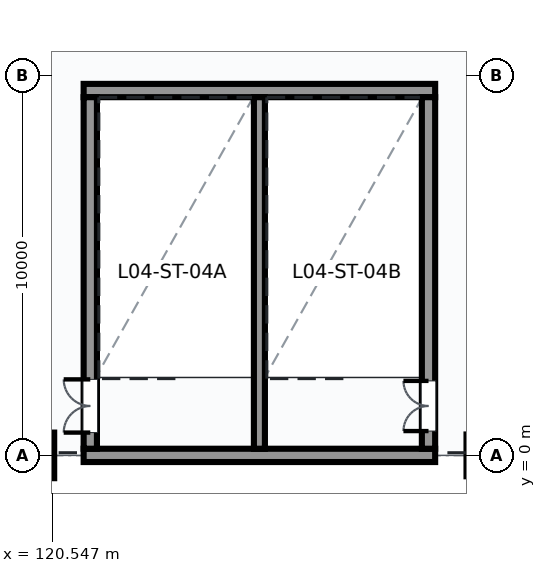
"""IFC4 building model, lengths in metres.
Left out: names, types, materials, properties, quantities, classifications, styles, units other than length and angle.
Written with IfcOpenShell. Run it as: python <this file> out.ifc"""

import sys

from ifc_helpers import new_model, si_unit, direction, frame, frame_2d, origin, origin_2d, place, context, subcontext, project, spatial, rectangle, extrude, element, fill, save


model = new_model("IFC4")
c1 = context("Model", 3, precision=1e-05, world=origin(), true_north=direction((0.0, 1.0)))
c2 = subcontext(c1, "Body", "Model", "MODEL_VIEW")
j1 = project(units=[si_unit("LENGTHUNIT", "METRE"), si_unit("PLANEANGLEUNIT", "RADIAN")], contexts=[c1])
p1 = place(None, origin())
s1 = spatial("IfcSite", under=j1, at=p1, CompositionType="ELEMENT")
p2 = place(p1, origin())
s2 = spatial("IfcBuilding", under=s1, at=p2, CompositionType="ELEMENT")
p3 = place(p2, frame((0.0, 0.0, 19.2)))
s3 = spatial("IfcBuildingStorey", under=s2, at=p3, CompositionType="ELEMENT", Elevation=19.2)
p4 = place(p3, frame((120.0, 0.0, 0.0), z_axis=(0.0, 0.0, 1.0), x_axis=(1.0, 0.0, 0.0)))
e1 = element("IfcColumn", 1, at=p4, inside=s3, PredefinedType="COLUMN", context=c2, shape_type="SweptSolid", body=[
    extrude(rectangle(XDim=1.2, YDim=1.2, at=origin_2d()), origin(), (0.0, 0.0, 1.0), 5.4),
])
for number, where, z_axis, x_axis in (
    (2, (121.375, 0.0, 0.0), (0.0, 0.0, 1.0), (1.0, 0.0, 0.0)),
    (3, (121.375, 9.6, 0.0), (0.0, 0.0, 1.0), (1.0, 0.0, 0.0)),
):
    element("IfcWall", number, at=place(p3, frame(where, z_axis=z_axis, x_axis=x_axis)), inside=s3, PredefinedType="SHEAR", context=c2, shape_type="SweptSolid", body=[
        extrude(rectangle(XDim=9.25, YDim=0.35, at=frame_2d((4.625, 0.0))), origin(), (0.0, 0.0, 1.0), 5.4),
    ])
p5 = place(p3, frame((121.55, 0.175, 0.0), z_axis=(0.0, 0.0, 1.0), x_axis=(0.0, 1.0, 0.0)))
e4 = element("IfcWall", 4, at=p5, inside=s3, PredefinedType="SHEAR", context=c2, shape_type="SweptSolid", body=[
    extrude(rectangle(XDim=9.25, YDim=0.35, at=frame_2d((4.625, 0.0))), origin(), (0.0, 0.0, 1.0), 5.4),
])
p6 = place(p5, frame((0.425, 0.0, 0.0)))
e5 = element("IfcOpeningElement", 5, at=p6, cuts=e4, PredefinedType="OPENING", context=c2, shape_type="SweptSolid", body=[
    extrude(rectangle(XDim=1.4, YDim=2.2, at=frame_2d((0.7, 1.1))), frame((0.0, 0.185, 0.0), z_axis=(0.0, -1.0, 0.0), x_axis=(1.0, 0.0, 0.0)), (0.0, 0.0, 1.0), 0.37),
])
p7 = place(p3, frame((130.45, 0.175, 0.0), z_axis=(0.0, 0.0, 1.0), x_axis=(0.0, 1.0, 0.0)))
e6 = element("IfcWall", 6, at=p7, inside=s3, PredefinedType="SHEAR", context=c2, shape_type="SweptSolid", body=[
    extrude(rectangle(XDim=9.25, YDim=0.35, at=frame_2d((4.625, 0.0))), origin(), (0.0, 0.0, 1.0), 5.4),
])
p8 = place(p7, frame((0.465, 0.0, 0.0)))
e7 = element("IfcOpeningElement", 7, at=p8, cuts=e6, PredefinedType="OPENING", context=c2, shape_type="SweptSolid", body=[
    extrude(rectangle(XDim=1.32, YDim=2.2, at=frame_2d((0.66, 1.1))), frame((0.0, 0.185, 0.0), z_axis=(0.0, -1.0, 0.0), x_axis=(1.0, 0.0, 0.0)), (0.0, 0.0, 1.0), 0.37),
])
p9 = place(p3, frame((126.0, 0.175, 0.0), z_axis=(0.0, 0.0, 1.0), x_axis=(0.0, 1.0, 0.0)))
e8 = element("IfcWall", 8, at=p9, inside=s3, PredefinedType="SHEAR", context=c2, shape_type="SweptSolid", body=[
    extrude(rectangle(XDim=9.25, YDim=0.29, at=frame_2d((4.625, 0.0))), origin(), (0.0, 0.0, 1.0), 5.4),
])
p10 = place(p6, frame((1.4, 0.0, 0.0), z_axis=(0.0, 0.0, 1.0), x_axis=(-1.0, 0.0, 0.0)))
e9 = element("IfcDoor", 9, at=p10, inside=s3, OperationType="DOUBLE_DOOR_SINGLE_SWING", PredefinedType="DOOR", context=c2, shape_type="SweptSolid", body=[
    extrude(rectangle(XDim=1.4, YDim=2.2, at=frame_2d((0.7, 1.1))), frame((0.0, 0.025, 0.0), z_axis=(0.0, -1.0, 0.0), x_axis=(1.0, 0.0, 0.0)), (0.0, 0.0, 1.0), 0.05),
])
fill(e5, e9)
p11 = place(p8, origin())
e10 = element("IfcDoor", 10, at=p11, inside=s3, OperationType="DOUBLE_DOOR_SINGLE_SWING", PredefinedType="DOOR", context=c2, shape_type="SweptSolid", body=[
    extrude(rectangle(XDim=1.32, YDim=2.2, at=frame_2d((0.66, 1.1))), frame((0.0, 0.025, 0.0), z_axis=(0.0, -1.0, 0.0), x_axis=(1.0, 0.0, 0.0)), (0.0, 0.0, 1.0), 0.05),
])
fill(e7, e10)
save(model, sys.argv[1])
